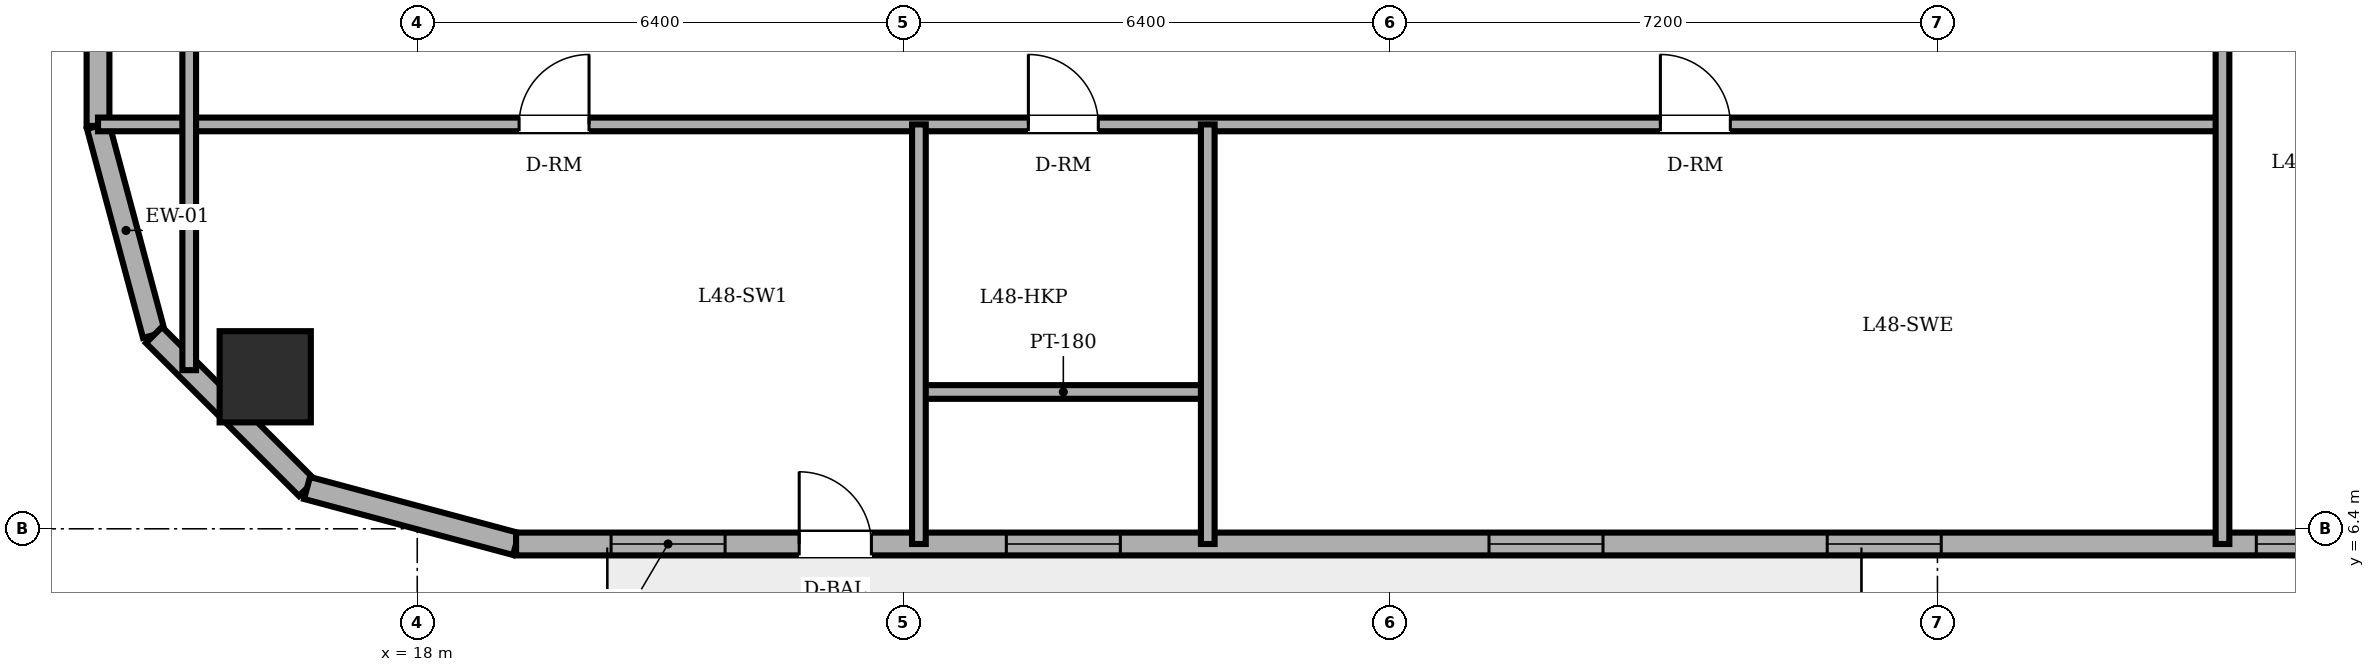
"""IFC4 building model, lengths in metres.
Left out: names, types, materials, properties, quantities, classifications, styles, units other than length and angle.
Written with IfcOpenShell. Run it as: python <this file> out.ifc"""

import sys

from ifc_helpers import new_model, si_unit, direction, frame, frame_2d, origin, origin_2d, place, context, subcontext, project, spatial, rectangle, circle, extrude, element, fill, save


model = new_model("IFC4")
c1 = context("Model", 3, precision=1e-05, world=origin(), true_north=direction((0.0, 1.0)))
c2 = subcontext(c1, "Body", "Model", "MODEL_VIEW")
j1 = project(units=[si_unit("LENGTHUNIT", "METRE"), si_unit("PLANEANGLEUNIT", "RADIAN")], contexts=[c1])
p1 = place(None, origin())
s1 = spatial("IfcSite", under=j1, at=p1, CompositionType="ELEMENT")
p2 = place(p1, origin())
s2 = spatial("IfcBuilding", under=s1, at=p2, CompositionType="ELEMENT")
p3 = place(p2, frame((0.0, 0.0, 183.4)))
s3 = spatial("IfcBuildingStorey", under=s2, at=p3, CompositionType="ELEMENT", Elevation=183.4)
p4 = place(p3, frame((16.0, 8.4, 0.0), z_axis=(0.0, 0.0, 1.0), x_axis=(1.0, 0.0, 0.0)))
e1 = element("IfcColumn", 1, at=p4, inside=s3, PredefinedType="COLUMN", context=c2, shape_type="SweptSolid", body=[
    extrude(circle(Radius=0.6, at=origin_2d()), origin(), (0.0, 0.0, 1.0), 3.6),
])
p5 = place(p3, frame((13.8, 11.7, 0.0), z_axis=(0.0, 0.0, 1.0), x_axis=(0.258884674387, -0.965908238586, 0.0)))
e2 = element("IfcWall", 2, at=p5, inside=s3, PredefinedType="SOLIDWALL", context=c2, shape_type="SweptSolid", body=[
    extrude(rectangle(XDim=2.847, YDim=0.3, at=frame_2d((1.424, 0.0))), origin(), (0.0, 0.0, 1.0), 3.4),
])
p6 = place(p3, frame((14.537, 8.95, 0.0), z_axis=(0.0, 0.0, 1.0), x_axis=(0.707106781187, -0.707106781187, 0.0)))
e3 = element("IfcWall", 3, at=p6, inside=s3, PredefinedType="SOLIDWALL", context=c2, shape_type="SweptSolid", body=[
    extrude(rectangle(XDim=2.847, YDim=0.3, at=frame_2d((1.423, 0.0))), origin(), (0.0, 0.0, 1.0), 3.4),
])
p7 = place(p3, frame((16.55, 6.937, 0.0), z_axis=(0.0, 0.0, 1.0), x_axis=(0.965908238586, -0.258884674387, 0.0)))
e4 = element("IfcWall", 4, at=p7, inside=s3, PredefinedType="SOLIDWALL", context=c2, shape_type="SweptSolid", body=[
    extrude(rectangle(XDim=2.847, YDim=0.3, at=frame_2d((1.424, 0.0))), origin(), (0.0, 0.0, 1.0), 3.4),
])
p8 = place(p3, frame((19.3, 6.2, 0.0), z_axis=(0.0, 0.0, 1.0), x_axis=(1.0, 0.0, 0.0)))
e5 = element("IfcWall", 5, at=p8, inside=s3, PredefinedType="SOLIDWALL", context=c2, shape_type="SweptSolid", body=[
    extrude(rectangle(XDim=30.282, YDim=0.3, at=frame_2d((15.141, 0.0))), origin(), (0.0, 0.0, 1.0), 3.4),
])
p9 = place(p8, frame((3.725, 0.0, 0.0)))
e6 = element("IfcOpeningElement", 6, at=p9, cuts=e5, PredefinedType="OPENING", context=c2, shape_type="SweptSolid", body=[
    extrude(rectangle(XDim=0.95, YDim=2.2, at=frame_2d((0.475, 1.1))), frame((0.0, 0.16, 0.0), z_axis=(0.0, -1.0, 0.0), x_axis=(1.0, 0.0, 0.0)), (0.0, 0.0, 1.0), 0.32),
])
p10 = place(p8, frame((1.25, 0.0, 0.85)))
e7 = element("IfcOpeningElement", 7, at=p10, cuts=e5, PredefinedType="OPENING", context=c2, shape_type="SweptSolid", body=[
    extrude(rectangle(XDim=1.5, YDim=1.55, at=frame_2d((0.75, 0.775))), frame((0.0, 0.16, 0.0), z_axis=(0.0, -1.0, 0.0), x_axis=(1.0, 0.0, 0.0)), (0.0, 0.0, 1.0), 0.32),
])
p11 = place(p8, frame((6.45, 0.0, 0.85)))
e8 = element("IfcOpeningElement", 8, at=p11, cuts=e5, PredefinedType="OPENING", context=c2, shape_type="SweptSolid", body=[
    extrude(rectangle(XDim=1.5, YDim=1.55, at=frame_2d((0.75, 0.775))), frame((0.0, 0.16, 0.0), z_axis=(0.0, -1.0, 0.0), x_axis=(1.0, 0.0, 0.0)), (0.0, 0.0, 1.0), 0.32),
])
p12 = place(p8, frame((12.8, 0.0, 0.85)))
e9 = element("IfcOpeningElement", 9, at=p12, cuts=e5, PredefinedType="OPENING", context=c2, shape_type="SweptSolid", body=[
    extrude(rectangle(XDim=1.5, YDim=1.55, at=frame_2d((0.75, 0.775))), frame((0.0, 0.16, 0.0), z_axis=(0.0, -1.0, 0.0), x_axis=(1.0, 0.0, 0.0)), (0.0, 0.0, 1.0), 0.32),
])
p13 = place(p8, frame((17.25, 0.0, 0.85)))
e10 = element("IfcOpeningElement", 10, at=p13, cuts=e5, PredefinedType="OPENING", context=c2, shape_type="SweptSolid", body=[
    extrude(rectangle(XDim=1.5, YDim=1.55, at=frame_2d((0.75, 0.775))), frame((0.0, 0.16, 0.0), z_axis=(0.0, -1.0, 0.0), x_axis=(1.0, 0.0, 0.0)), (0.0, 0.0, 1.0), 0.32),
])
p14 = place(p8, frame((22.895, 0.0, 0.85)))
e11 = element("IfcOpeningElement", 11, at=p14, cuts=e5, PredefinedType="OPENING", context=c2, shape_type="SweptSolid", body=[
    extrude(rectangle(XDim=1.5, YDim=1.55, at=frame_2d((0.75, 0.775))), frame((0.0, 0.16, 0.0), z_axis=(0.0, -1.0, 0.0), x_axis=(1.0, 0.0, 0.0)), (0.0, 0.0, 1.0), 0.32),
])
p15 = place(p8, frame((25.848, 0.0, 0.85)))
e12 = element("IfcOpeningElement", 12, at=p15, cuts=e5, PredefinedType="OPENING", context=c2, shape_type="SweptSolid", body=[
    extrude(rectangle(XDim=1.5, YDim=1.55, at=frame_2d((0.75, 0.775))), frame((0.0, 0.16, 0.0), z_axis=(0.0, -1.0, 0.0), x_axis=(1.0, 0.0, 0.0)), (0.0, 0.0, 1.0), 0.32),
])
p16 = place(p3, frame((13.8, 36.3, 0.0), z_axis=(0.0, 0.0, 1.0), x_axis=(0.0, -1.0, 0.0)))
e13 = element("IfcWall", 13, at=p16, inside=s3, PredefinedType="SOLIDWALL", context=c2, shape_type="SweptSolid", body=[
    extrude(rectangle(XDim=24.6, YDim=0.3, at=frame_2d((12.3, 0.0))), origin(), (0.0, 0.0, 1.0), 3.4),
])
p17 = place(p16, frame((5.003, 0.0, 0.85)))
e14 = element("IfcOpeningElement", 14, at=p17, cuts=e13, PredefinedType="OPENING", context=c2, shape_type="SweptSolid", body=[
    extrude(rectangle(XDim=1.5, YDim=1.55, at=frame_2d((0.75, 0.775))), frame((0.0, 0.16, 0.0), z_axis=(0.0, -1.0, 0.0), x_axis=(1.0, 0.0, 0.0)), (0.0, 0.0, 1.0), 0.32),
])
p18 = place(p16, frame((8.277, 0.0, 0.85)))
e15 = element("IfcOpeningElement", 15, at=p18, cuts=e13, PredefinedType="OPENING", context=c2, shape_type="SweptSolid", body=[
    extrude(rectangle(XDim=1.5, YDim=1.55, at=frame_2d((0.75, 0.775))), frame((0.0, 0.16, 0.0), z_axis=(0.0, -1.0, 0.0), x_axis=(1.0, 0.0, 0.0)), (0.0, 0.0, 1.0), 0.32),
])
p19 = place(p16, frame((14.823, 0.0, 0.85)))
e16 = element("IfcOpeningElement", 16, at=p19, cuts=e13, PredefinedType="OPENING", context=c2, shape_type="SweptSolid", body=[
    extrude(rectangle(XDim=1.5, YDim=1.55, at=frame_2d((0.75, 0.775))), frame((0.0, 0.16, 0.0), z_axis=(0.0, -1.0, 0.0), x_axis=(1.0, 0.0, 0.0)), (0.0, 0.0, 1.0), 0.32),
])
p20 = place(p16, frame((18.097, 0.0, 0.85)))
e17 = element("IfcOpeningElement", 17, at=p20, cuts=e13, PredefinedType="OPENING", context=c2, shape_type="SweptSolid", body=[
    extrude(rectangle(XDim=1.5, YDim=1.55, at=frame_2d((0.75, 0.775))), frame((0.0, 0.16, 0.0), z_axis=(0.0, -1.0, 0.0), x_axis=(1.0, 0.0, 0.0)), (0.0, 0.0, 1.0), 0.32),
])
p21 = place(p3, frame((24.6, 8.2, 0.0), z_axis=(0.0, 0.0, 1.0), x_axis=(1.0, 0.0, 0.0)))
e18 = element("IfcWall", 18, at=p21, inside=s3, PredefinedType="PARTITIONING", context=c2, shape_type="SweptSolid", body=[
    extrude(rectangle(XDim=3.8, YDim=0.18, at=frame_2d((1.9, 0.0))), origin(), (0.0, 0.0, 1.0), 2.882),
])
p22 = place(p3, frame((13.8, 11.72, 0.0), z_axis=(0.0, 0.0, 1.0), x_axis=(1.0, 0.0, 0.0)))
e19 = element("IfcWall", 19, at=p22, inside=s3, PredefinedType="PARTITIONING", context=c2, shape_type="SweptSolid", body=[
    extrude(rectangle(XDim=27.95, YDim=0.18, at=frame_2d((13.975, 0.0))), origin(), (0.0, 0.0, 1.0), 3.4),
])
p23 = place(p22, frame((12.24, 0.0, 0.0)))
e20 = element("IfcOpeningElement", 20, at=p23, cuts=e19, PredefinedType="OPENING", context=c2, shape_type="SweptSolid", body=[
    extrude(rectangle(XDim=0.92, YDim=2.1, at=frame_2d((0.46, 1.05))), frame((0.0, 0.1, 0.0), z_axis=(0.0, -1.0, 0.0), x_axis=(1.0, 0.0, 0.0)), (0.0, 0.0, 1.0), 0.2),
])
p24 = place(p22, frame((5.54, 0.0, 0.0)))
e21 = element("IfcOpeningElement", 21, at=p24, cuts=e19, PredefinedType="OPENING", context=c2, shape_type="SweptSolid", body=[
    extrude(rectangle(XDim=0.92, YDim=2.1, at=frame_2d((0.46, 1.05))), frame((0.0, 0.1, 0.0), z_axis=(0.0, -1.0, 0.0), x_axis=(1.0, 0.0, 0.0)), (0.0, 0.0, 1.0), 0.2),
])
p25 = place(p22, frame((20.555, 0.0, 0.0)))
e22 = element("IfcOpeningElement", 22, at=p25, cuts=e19, PredefinedType="OPENING", context=c2, shape_type="SweptSolid", body=[
    extrude(rectangle(XDim=0.92, YDim=2.1, at=frame_2d((0.46, 1.05))), frame((0.0, 0.1, 0.0), z_axis=(0.0, -1.0, 0.0), x_axis=(1.0, 0.0, 0.0)), (0.0, 0.0, 1.0), 0.2),
])
p26 = place(p3, frame((15.0, 8.487, 0.0), z_axis=(0.0, 0.0, 1.0), x_axis=(0.0, 1.0, 0.0)))
e23 = element("IfcWall", 23, at=p26, inside=s3, PredefinedType="PARTITIONING", context=c2, shape_type="SweptSolid", body=[
    extrude(rectangle(XDim=5.693, YDim=0.18, at=frame_2d((2.846, 0.0))), origin(), (0.0, 0.0, 1.0), 3.4),
])
for number, where, z_axis, x_axis in (
    (24, (24.6, 6.2, 0.0), (0.0, 0.0, 1.0), (0.0, 1.0, 0.0)),
    (25, (28.4, 6.2, 0.0), (0.0, 0.0, 1.0), (0.0, 1.0, 0.0)),
):
    element("IfcWall", number, at=place(p3, frame(where, z_axis=z_axis, x_axis=x_axis)), inside=s3, PredefinedType="PARTITIONING", context=c2, shape_type="SweptSolid", body=[
        extrude(rectangle(XDim=5.52, YDim=0.18, at=frame_2d((2.76, 0.0))), origin(), (0.0, 0.0, 1.0), 3.4),
    ])
p27 = place(p3, frame((41.75, 6.2, 0.0), z_axis=(0.0, 0.0, 1.0), x_axis=(0.0, 1.0, 0.0)))
e26 = element("IfcWall", 26, at=p27, inside=s3, PredefinedType="PARTITIONING", context=c2, shape_type="SweptSolid", body=[
    extrude(rectangle(XDim=16.62, YDim=0.18, at=frame_2d((8.31, 0.0))), origin(), (0.0, 0.0, 1.0), 3.4),
])
p28 = place(p27, frame((10.35, 0.0, 0.0)))
e27 = element("IfcOpeningElement", 27, at=p28, cuts=e26, PredefinedType="OPENING", context=c2, shape_type="SweptSolid", body=[
    extrude(rectangle(XDim=0.92, YDim=2.1, at=frame_2d((0.46, 1.05))), frame((0.0, 0.1, 0.0), z_axis=(0.0, -1.0, 0.0), x_axis=(1.0, 0.0, 0.0)), (0.0, 0.0, 1.0), 0.2),
])
p29 = place(p9, origin())
e28 = element("IfcDoor", 28, at=p29, inside=s3, OperationType="SINGLE_SWING_LEFT", PredefinedType="DOOR", context=c2, shape_type="SweptSolid", body=[
    extrude(rectangle(XDim=0.95, YDim=2.2, at=frame_2d((0.475, 1.1))), frame((0.0, 0.025, 0.0), z_axis=(0.0, -1.0, 0.0), x_axis=(1.0, 0.0, 0.0)), (0.0, 0.0, 1.0), 0.05),
])
fill(e6, e28)
p30 = place(p10, origin())
e29 = element("IfcWindow", 29, at=p30, inside=s3, PartitioningType="DOUBLE_PANEL_VERTICAL", PredefinedType="WINDOW", context=c2, shape_type="SweptSolid", body=[
    extrude(rectangle(XDim=1.5, YDim=1.55, at=frame_2d((0.75, 0.775))), frame((0.0, 0.03, 0.0), z_axis=(0.0, -1.0, 0.0), x_axis=(1.0, 0.0, 0.0)), (0.0, 0.0, 1.0), 0.06),
])
fill(e7, e29)
p31 = place(p11, origin())
e30 = element("IfcWindow", 30, at=p31, inside=s3, PartitioningType="DOUBLE_PANEL_VERTICAL", PredefinedType="WINDOW", context=c2, shape_type="SweptSolid", body=[
    extrude(rectangle(XDim=1.5, YDim=1.55, at=frame_2d((0.75, 0.775))), frame((0.0, 0.03, 0.0), z_axis=(0.0, -1.0, 0.0), x_axis=(1.0, 0.0, 0.0)), (0.0, 0.0, 1.0), 0.06),
])
fill(e8, e30)
p32 = place(p12, origin())
e31 = element("IfcWindow", 31, at=p32, inside=s3, PartitioningType="DOUBLE_PANEL_VERTICAL", PredefinedType="WINDOW", context=c2, shape_type="SweptSolid", body=[
    extrude(rectangle(XDim=1.5, YDim=1.55, at=frame_2d((0.75, 0.775))), frame((0.0, 0.03, 0.0), z_axis=(0.0, -1.0, 0.0), x_axis=(1.0, 0.0, 0.0)), (0.0, 0.0, 1.0), 0.06),
])
fill(e9, e31)
p33 = place(p13, origin())
e32 = element("IfcWindow", 32, at=p33, inside=s3, PartitioningType="DOUBLE_PANEL_VERTICAL", PredefinedType="WINDOW", context=c2, shape_type="SweptSolid", body=[
    extrude(rectangle(XDim=1.5, YDim=1.55, at=frame_2d((0.75, 0.775))), frame((0.0, 0.03, 0.0), z_axis=(0.0, -1.0, 0.0), x_axis=(1.0, 0.0, 0.0)), (0.0, 0.0, 1.0), 0.06),
])
fill(e10, e32)
p34 = place(p14, origin())
e33 = element("IfcWindow", 33, at=p34, inside=s3, PartitioningType="DOUBLE_PANEL_VERTICAL", PredefinedType="WINDOW", context=c2, shape_type="SweptSolid", body=[
    extrude(rectangle(XDim=1.5, YDim=1.55, at=frame_2d((0.75, 0.775))), frame((0.0, 0.03, 0.0), z_axis=(0.0, -1.0, 0.0), x_axis=(1.0, 0.0, 0.0)), (0.0, 0.0, 1.0), 0.06),
])
fill(e11, e33)
p35 = place(p23, origin())
e34 = element("IfcDoor", 34, at=p35, inside=s3, OperationType="SINGLE_SWING_LEFT", PredefinedType="DOOR", context=c2, shape_type="SweptSolid", body=[
    extrude(rectangle(XDim=0.92, YDim=2.1, at=frame_2d((0.46, 1.05))), frame((0.0, 0.025, 0.0), z_axis=(0.0, -1.0, 0.0), x_axis=(1.0, 0.0, 0.0)), (0.0, 0.0, 1.0), 0.05),
])
fill(e20, e34)
p36 = place(p24, origin())
e35 = element("IfcDoor", 35, at=p36, inside=s3, OperationType="SINGLE_SWING_RIGHT", PredefinedType="DOOR", context=c2, shape_type="SweptSolid", body=[
    extrude(rectangle(XDim=0.92, YDim=2.1, at=frame_2d((0.46, 1.05))), frame((0.0, 0.025, 0.0), z_axis=(0.0, -1.0, 0.0), x_axis=(1.0, 0.0, 0.0)), (0.0, 0.0, 1.0), 0.05),
])
fill(e21, e35)
p37 = place(p25, origin())
e36 = element("IfcDoor", 36, at=p37, inside=s3, OperationType="SINGLE_SWING_LEFT", PredefinedType="DOOR", context=c2, shape_type="SweptSolid", body=[
    extrude(rectangle(XDim=0.92, YDim=2.1, at=frame_2d((0.46, 1.05))), frame((0.0, 0.025, 0.0), z_axis=(0.0, -1.0, 0.0), x_axis=(1.0, 0.0, 0.0)), (0.0, 0.0, 1.0), 0.05),
])
fill(e22, e36)
save(model, sys.argv[1])
